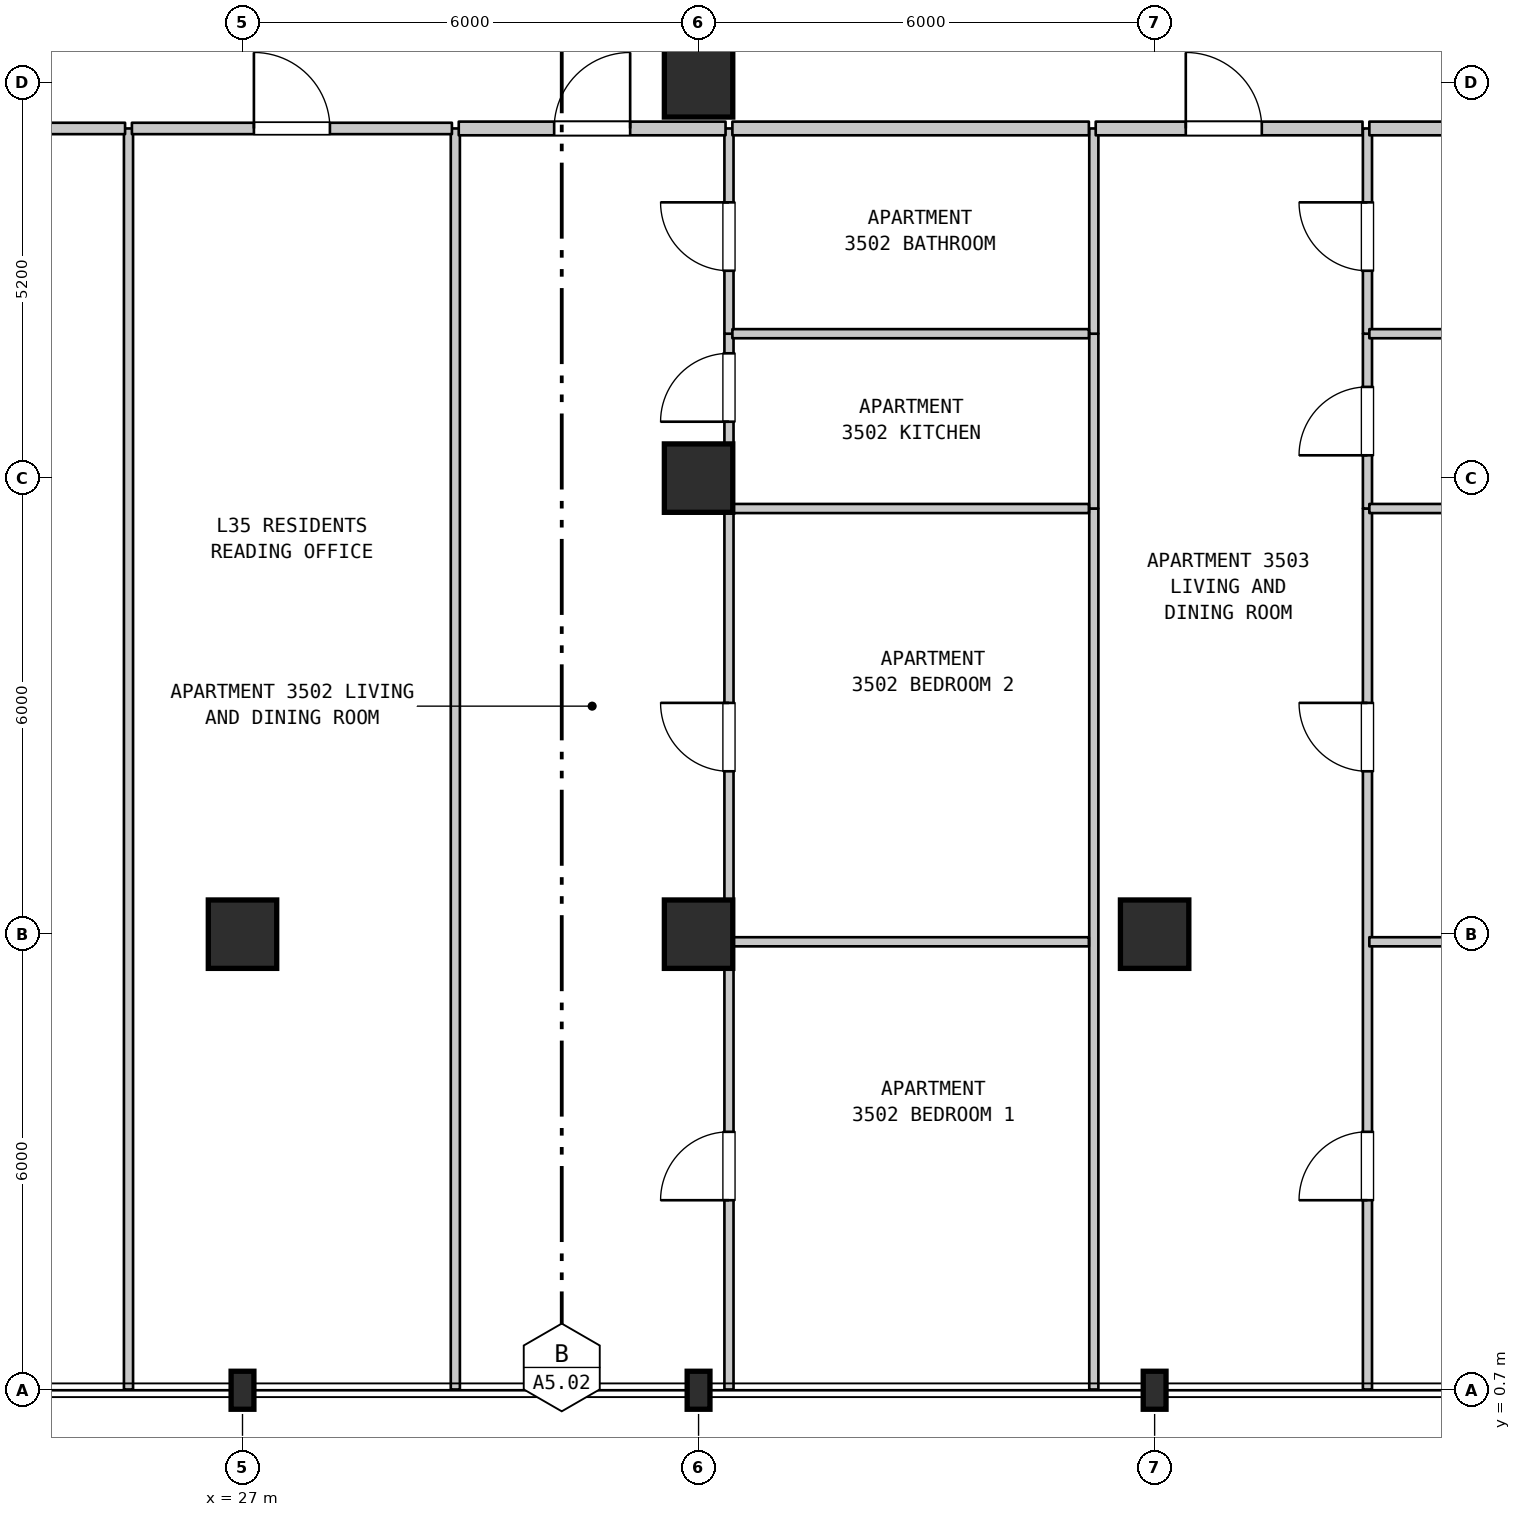
"""IFC4 building model, lengths in metres.
Left out: names, types, materials, properties, quantities, classifications, styles, units other than length and angle.
Written with IfcOpenShell. Run it as: python <this file> out.ifc"""

import sys

from ifc_helpers import new_model, si_unit, direction, frame, frame_2d, origin, origin_2d, place, context, subcontext, project, spatial, rectangle, i_section, extrude, element, fill, save


model = new_model("IFC4")
c1 = context("Model", 3, precision=1e-05, world=origin(), true_north=direction((0.0, 1.0)))
c2 = subcontext(c1, "Body", "Model", "MODEL_VIEW")
j1 = project(units=[si_unit("LENGTHUNIT", "METRE"), si_unit("PLANEANGLEUNIT", "RADIAN")], contexts=[c1])
p1 = place(None, origin())
s1 = spatial("IfcSite", under=j1, at=p1, CompositionType="ELEMENT")
p2 = place(p1, origin())
s2 = spatial("IfcBuilding", under=s1, at=p2, CompositionType="ELEMENT")
p3 = place(p2, frame((0.0, 0.0, 144.6)))
s3 = spatial("IfcBuildingStorey", under=s2, at=p3, CompositionType="ELEMENT", Elevation=144.6)
p4 = place(p3, frame((27.0, 0.7, 0.0), z_axis=(0.0, 0.0, 1.0), x_axis=(1.0, 0.0, 0.0)))
e1 = element("IfcColumn", 1, at=p4, inside=s3, PredefinedType="COLUMN", context=c2, shape_type="SweptSolid", body=[
    extrude(i_section(OverallWidth=0.3, OverallDepth=0.5, WebThickness=0.014, FlangeThickness=0.028, FilletRadius=0.027, at=origin_2d()), origin(), (0.0, 0.0, 1.0), 3.7),
])
p5 = place(p3, frame((27.0, 6.7, 0.0), z_axis=(0.0, 0.0, 1.0), x_axis=(1.0, 0.0, 0.0)))
e2 = element("IfcColumn", 2, at=p5, inside=s3, PredefinedType="COLUMN", context=c2, shape_type="SweptSolid", body=[
    extrude(rectangle(XDim=0.9, YDim=0.9, at=origin_2d()), origin(), (0.0, 0.0, 1.0), 3.7),
])
p6 = place(p3, frame((33.0, 0.7, 0.0), z_axis=(0.0, 0.0, 1.0), x_axis=(1.0, 0.0, 0.0)))
e3 = element("IfcColumn", 3, at=p6, inside=s3, PredefinedType="COLUMN", context=c2, shape_type="SweptSolid", body=[
    extrude(i_section(OverallWidth=0.3, OverallDepth=0.5, WebThickness=0.014, FlangeThickness=0.028, FilletRadius=0.027, at=origin_2d()), origin(), (0.0, 0.0, 1.0), 3.7),
])
for number, where, z_axis, x_axis in (
    (4, (33.0, 6.7, 0.0), (0.0, 0.0, 1.0), (1.0, 0.0, 0.0)),
    (5, (33.0, 12.7, 0.0), (0.0, 0.0, 1.0), (1.0, 0.0, 0.0)),
    (6, (33.0, 17.9, 0.0), (0.0, 0.0, 1.0), (1.0, 0.0, 0.0)),
):
    element("IfcColumn", number, at=place(p3, frame(where, z_axis=z_axis, x_axis=x_axis)), inside=s3, PredefinedType="COLUMN", context=c2, shape_type="SweptSolid", body=[
        extrude(rectangle(XDim=0.9, YDim=0.9, at=origin_2d()), origin(), (0.0, 0.0, 1.0), 3.7),
    ])
p7 = place(p3, frame((39.0, 0.7, 0.0), z_axis=(0.0, 0.0, 1.0), x_axis=(1.0, 0.0, 0.0)))
e7 = element("IfcColumn", 7, at=p7, inside=s3, PredefinedType="COLUMN", context=c2, shape_type="SweptSolid", body=[
    extrude(i_section(OverallWidth=0.3, OverallDepth=0.5, WebThickness=0.014, FlangeThickness=0.028, FilletRadius=0.027, at=origin_2d()), origin(), (0.0, 0.0, 1.0), 3.7),
])
p8 = place(p3, frame((39.0, 6.7, 0.0), z_axis=(0.0, 0.0, 1.0), x_axis=(1.0, 0.0, 0.0)))
e8 = element("IfcColumn", 8, at=p8, inside=s3, PredefinedType="COLUMN", context=c2, shape_type="SweptSolid", body=[
    extrude(rectangle(XDim=0.9, YDim=0.9, at=origin_2d()), origin(), (0.0, 0.0, 1.0), 3.7),
])
for number, where, z_axis, x_axis in (
    (9, (25.5, 0.71, 0.0), (0.0, 0.0, 1.0), (0.0, 1.0, 0.0)),
    (10, (29.8, 0.71, 0.0), (0.0, 0.0, 1.0), (0.0, 1.0, 0.0)),
):
    element("IfcWall", number, at=place(p3, frame(where, z_axis=z_axis, x_axis=x_axis)), inside=s3, PredefinedType="PARTITIONING", context=c2, shape_type="SweptSolid", body=[
        extrude(rectangle(XDim=16.59, YDim=0.12, at=frame_2d((8.295, 0.0))), origin(), (0.0, 0.0, 1.0), 3.385),
    ])
p9 = place(p3, frame((33.4, 0.71, 0.0), z_axis=(0.0, 0.0, 1.0), x_axis=(0.0, 1.0, 0.0)))
e11 = element("IfcWall", 11, at=p9, inside=s3, PredefinedType="PARTITIONING", context=c2, shape_type="SweptSolid", body=[
    extrude(rectangle(XDim=11.59, YDim=0.12, at=frame_2d((5.795, 0.0))), origin(), (0.0, 0.0, 1.0), 3.385),
])
p10 = place(p9, frame((2.49, 0.0, 0.0)))
e12 = element("IfcOpeningElement", 12, at=p10, cuts=e11, PredefinedType="OPENING", context=c2, shape_type="SweptSolid", body=[
    extrude(rectangle(XDim=0.9, YDim=2.15, at=frame_2d((0.45, 1.075))), frame((0.0, 0.07, 0.0), z_axis=(0.0, -1.0, 0.0), x_axis=(1.0, 0.0, 0.0)), (0.0, 0.0, 1.0), 0.14),
])
p11 = place(p9, frame((8.133, 0.0, 0.0)))
e13 = element("IfcOpeningElement", 13, at=p11, cuts=e11, PredefinedType="OPENING", context=c2, shape_type="SweptSolid", body=[
    extrude(rectangle(XDim=0.9, YDim=2.15, at=frame_2d((0.45, 1.075))), frame((0.0, 0.07, 0.0), z_axis=(0.0, -1.0, 0.0), x_axis=(1.0, 0.0, 0.0)), (0.0, 0.0, 1.0), 0.14),
])
p12 = place(p3, frame((33.4, 12.3, 0.0), z_axis=(0.0, 0.0, 1.0), x_axis=(0.0, 1.0, 0.0)))
e14 = element("IfcWall", 14, at=p12, inside=s3, PredefinedType="PARTITIONING", context=c2, shape_type="SweptSolid", body=[
    extrude(rectangle(XDim=2.3, YDim=0.12, at=frame_2d((1.15, 0.0))), origin(), (0.0, 0.0, 1.0), 3.385),
])
p13 = place(p12, frame((1.142, 0.0, 0.0)))
e15 = element("IfcOpeningElement", 15, at=p13, cuts=e14, PredefinedType="OPENING", context=c2, shape_type="SweptSolid", body=[
    extrude(rectangle(XDim=0.9, YDim=2.15, at=frame_2d((0.45, 1.075))), frame((0.0, 0.07, 0.0), z_axis=(0.0, -1.0, 0.0), x_axis=(1.0, 0.0, 0.0)), (0.0, 0.0, 1.0), 0.14),
])
p14 = place(p3, frame((33.4, 14.6, 0.0), z_axis=(0.0, 0.0, 1.0), x_axis=(0.0, 1.0, 0.0)))
e16 = element("IfcWall", 16, at=p14, inside=s3, PredefinedType="PARTITIONING", context=c2, shape_type="SweptSolid", body=[
    extrude(rectangle(XDim=2.7, YDim=0.12, at=frame_2d((1.35, 0.0))), origin(), (0.0, 0.0, 1.0), 3.385),
])
p15 = place(p14, frame((0.828, 0.0, 0.0)))
e17 = element("IfcOpeningElement", 17, at=p15, cuts=e16, PredefinedType="OPENING", context=c2, shape_type="SweptSolid", body=[
    extrude(rectangle(XDim=0.9, YDim=2.1, at=frame_2d((0.45, 1.05))), frame((0.0, 0.07, 0.0), z_axis=(0.0, -1.0, 0.0), x_axis=(1.0, 0.0, 0.0)), (0.0, 0.0, 1.0), 0.14),
])
p16 = place(p3, frame((38.2, 0.71, 0.0), z_axis=(0.0, 0.0, 1.0), x_axis=(0.0, 1.0, 0.0)))
e18 = element("IfcWall", 18, at=p16, inside=s3, PredefinedType="PARTITIONING", context=c2, shape_type="SweptSolid", body=[
    extrude(rectangle(XDim=11.59, YDim=0.12, at=frame_2d((5.795, 0.0))), origin(), (0.0, 0.0, 1.0), 3.385),
])
p17 = place(p3, frame((38.2, 12.3, 0.0), z_axis=(0.0, 0.0, 1.0), x_axis=(0.0, 1.0, 0.0)))
e19 = element("IfcWall", 19, at=p17, inside=s3, PredefinedType="PARTITIONING", context=c2, shape_type="SweptSolid", body=[
    extrude(rectangle(XDim=2.3, YDim=0.12, at=frame_2d((1.15, 0.0))), origin(), (0.0, 0.0, 1.0), 3.385),
])
p18 = place(p3, frame((38.2, 14.6, 0.0), z_axis=(0.0, 0.0, 1.0), x_axis=(0.0, 1.0, 0.0)))
e20 = element("IfcWall", 20, at=p18, inside=s3, PredefinedType="PARTITIONING", context=c2, shape_type="SweptSolid", body=[
    extrude(rectangle(XDim=2.7, YDim=0.12, at=frame_2d((1.35, 0.0))), origin(), (0.0, 0.0, 1.0), 3.385),
])
p19 = place(p3, frame((41.8, 0.71, 0.0), z_axis=(0.0, 0.0, 1.0), x_axis=(0.0, 1.0, 0.0)))
e21 = element("IfcWall", 21, at=p19, inside=s3, PredefinedType="PARTITIONING", context=c2, shape_type="SweptSolid", body=[
    extrude(rectangle(XDim=11.59, YDim=0.12, at=frame_2d((5.795, 0.0))), origin(), (0.0, 0.0, 1.0), 3.385),
])
p20 = place(p19, frame((2.49, 0.0, 0.0)))
e22 = element("IfcOpeningElement", 22, at=p20, cuts=e21, PredefinedType="OPENING", context=c2, shape_type="SweptSolid", body=[
    extrude(rectangle(XDim=0.9, YDim=2.15, at=frame_2d((0.45, 1.075))), frame((0.0, 0.07, 0.0), z_axis=(0.0, -1.0, 0.0), x_axis=(1.0, 0.0, 0.0)), (0.0, 0.0, 1.0), 0.14),
])
p21 = place(p19, frame((8.133, 0.0, 0.0)))
e23 = element("IfcOpeningElement", 23, at=p21, cuts=e21, PredefinedType="OPENING", context=c2, shape_type="SweptSolid", body=[
    extrude(rectangle(XDim=0.9, YDim=2.15, at=frame_2d((0.45, 1.075))), frame((0.0, 0.07, 0.0), z_axis=(0.0, -1.0, 0.0), x_axis=(1.0, 0.0, 0.0)), (0.0, 0.0, 1.0), 0.14),
])
p22 = place(p3, frame((41.8, 12.3, 0.0), z_axis=(0.0, 0.0, 1.0), x_axis=(0.0, 1.0, 0.0)))
e24 = element("IfcWall", 24, at=p22, inside=s3, PredefinedType="PARTITIONING", context=c2, shape_type="SweptSolid", body=[
    extrude(rectangle(XDim=2.3, YDim=0.12, at=frame_2d((1.15, 0.0))), origin(), (0.0, 0.0, 1.0), 3.385),
])
p23 = place(p22, frame((0.7, 0.0, 0.0)))
e25 = element("IfcOpeningElement", 25, at=p23, cuts=e24, PredefinedType="OPENING", context=c2, shape_type="SweptSolid", body=[
    extrude(rectangle(XDim=0.9, YDim=2.15, at=frame_2d((0.45, 1.075))), frame((0.0, 0.07, 0.0), z_axis=(0.0, -1.0, 0.0), x_axis=(1.0, 0.0, 0.0)), (0.0, 0.0, 1.0), 0.14),
])
p24 = place(p3, frame((41.8, 14.6, 0.0), z_axis=(0.0, 0.0, 1.0), x_axis=(0.0, 1.0, 0.0)))
e26 = element("IfcWall", 26, at=p24, inside=s3, PredefinedType="PARTITIONING", context=c2, shape_type="SweptSolid", body=[
    extrude(rectangle(XDim=2.7, YDim=0.12, at=frame_2d((1.35, 0.0))), origin(), (0.0, 0.0, 1.0), 3.385),
])
p25 = place(p24, frame((0.828, 0.0, 0.0)))
e27 = element("IfcOpeningElement", 27, at=p25, cuts=e26, PredefinedType="OPENING", context=c2, shape_type="SweptSolid", body=[
    extrude(rectangle(XDim=0.9, YDim=2.1, at=frame_2d((0.45, 1.05))), frame((0.0, 0.07, 0.0), z_axis=(0.0, -1.0, 0.0), x_axis=(1.0, 0.0, 0.0)), (0.0, 0.0, 1.0), 0.14),
])
p26 = place(p3, frame((33.445, 6.6, 0.0), z_axis=(0.0, 0.0, 1.0), x_axis=(1.0, 0.0, 0.0)))
e28 = element("IfcWall", 28, at=p26, inside=s3, PredefinedType="PARTITIONING", context=c2, shape_type="SweptSolid", body=[
    extrude(rectangle(XDim=4.69, YDim=0.12, at=frame_2d((2.345, 0.0))), origin(), (0.0, 0.0, 1.0), 2.935),
])
p27 = place(p3, frame((41.825, 6.6, 0.0), z_axis=(0.0, 0.0, 1.0), x_axis=(1.0, 0.0, 0.0)))
e29 = element("IfcWall", 29, at=p27, inside=s3, PredefinedType="PARTITIONING", context=c2, shape_type="SweptSolid", body=[
    extrude(rectangle(XDim=4.97, YDim=0.12, at=frame_2d((2.485, 0.0))), origin(), (0.0, 0.0, 1.0), 2.785),
])
p28 = place(p3, frame((33.445, 12.3, 0.0), z_axis=(0.0, 0.0, 1.0), x_axis=(1.0, 0.0, 0.0)))
e30 = element("IfcWall", 30, at=p28, inside=s3, PredefinedType="PARTITIONING", context=c2, shape_type="SweptSolid", body=[
    extrude(rectangle(XDim=4.69, YDim=0.12, at=frame_2d((2.345, 0.0))), origin(), (0.0, 0.0, 1.0), 3.385),
])
p29 = place(p3, frame((41.825, 12.3, 0.0), z_axis=(0.0, 0.0, 1.0), x_axis=(1.0, 0.0, 0.0)))
e31 = element("IfcWall", 31, at=p29, inside=s3, PredefinedType="PARTITIONING", context=c2, shape_type="SweptSolid", body=[
    extrude(rectangle(XDim=4.97, YDim=0.12, at=frame_2d((2.485, 0.0))), origin(), (0.0, 0.0, 1.0), 3.385),
])
p30 = place(p3, frame((33.445, 14.6, 0.0), z_axis=(0.0, 0.0, 1.0), x_axis=(1.0, 0.0, 0.0)))
e32 = element("IfcWall", 32, at=p30, inside=s3, PredefinedType="PARTITIONING", context=c2, shape_type="SweptSolid", body=[
    extrude(rectangle(XDim=4.69, YDim=0.12, at=frame_2d((2.345, 0.0))), origin(), (0.0, 0.0, 1.0), 3.385),
])
p31 = place(p3, frame((41.825, 14.6, 0.0), z_axis=(0.0, 0.0, 1.0), x_axis=(1.0, 0.0, 0.0)))
e33 = element("IfcWall", 33, at=p31, inside=s3, PredefinedType="PARTITIONING", context=c2, shape_type="SweptSolid", body=[
    extrude(rectangle(XDim=4.97, YDim=0.12, at=frame_2d((2.485, 0.0))), origin(), (0.0, 0.0, 1.0), 3.385),
])
p32 = place(p3, frame((20.545, 17.3, 0.0), z_axis=(0.0, 0.0, 1.0), x_axis=(1.0, 0.0, 0.0)))
e34 = element("IfcWall", 34, at=p32, inside=s3, PredefinedType="STANDARD", context=c2, shape_type="SweptSolid", body=[
    extrude(rectangle(XDim=4.91, YDim=0.15, at=frame_2d((2.455, 0.0))), origin(), (0.0, 0.0, 1.0), 3.385),
])
p33 = place(p32, frame((1.884, 0.0, 0.0)))
e35 = element("IfcOpeningElement", 35, at=p33, cuts=e34, PredefinedType="OPENING", context=c2, shape_type="SweptSolid", body=[
    extrude(rectangle(XDim=1.0, YDim=2.15, at=frame_2d((0.5, 1.075))), frame((0.0, 0.085, 0.0), z_axis=(0.0, -1.0, 0.0), x_axis=(1.0, 0.0, 0.0)), (0.0, 0.0, 1.0), 0.17),
])
p34 = place(p3, frame((25.545, 17.3, 0.0), z_axis=(0.0, 0.0, 1.0), x_axis=(1.0, 0.0, 0.0)))
e36 = element("IfcWall", 36, at=p34, inside=s3, PredefinedType="STANDARD", context=c2, shape_type="SweptSolid", body=[
    extrude(rectangle(XDim=4.21, YDim=0.15, at=frame_2d((2.105, 0.0))), origin(), (0.0, 0.0, 1.0), 3.385),
])
p35 = place(p34, frame((1.605, 0.0, 0.0)))
e37 = element("IfcOpeningElement", 37, at=p35, cuts=e36, PredefinedType="OPENING", context=c2, shape_type="SweptSolid", body=[
    extrude(rectangle(XDim=1.0, YDim=2.15, at=frame_2d((0.5, 1.075))), frame((0.0, 0.085, 0.0), z_axis=(0.0, -1.0, 0.0), x_axis=(1.0, 0.0, 0.0)), (0.0, 0.0, 1.0), 0.17),
])
p36 = place(p3, frame((29.845, 17.3, 0.0), z_axis=(0.0, 0.0, 1.0), x_axis=(1.0, 0.0, 0.0)))
e38 = element("IfcWall", 38, at=p36, inside=s3, PredefinedType="STANDARD", context=c2, shape_type="SweptSolid", body=[
    extrude(rectangle(XDim=3.51, YDim=0.18, at=frame_2d((1.755, 0.0))), origin(), (0.0, 0.0, 1.0), 3.385),
])
p37 = place(p36, frame((1.255, 0.0, 0.0)))
e39 = element("IfcOpeningElement", 39, at=p37, cuts=e38, PredefinedType="OPENING", context=c2, shape_type="SweptSolid", body=[
    extrude(rectangle(XDim=1.0, YDim=2.15, at=frame_2d((0.5, 1.075))), frame((0.0, 0.1, 0.0), z_axis=(0.0, -1.0, 0.0), x_axis=(1.0, 0.0, 0.0)), (0.0, 0.0, 1.0), 0.2),
])
p38 = place(p3, frame((33.445, 17.3, 0.0), z_axis=(0.0, 0.0, 1.0), x_axis=(1.0, 0.0, 0.0)))
e40 = element("IfcWall", 40, at=p38, inside=s3, PredefinedType="STANDARD", context=c2, shape_type="SweptSolid", body=[
    extrude(rectangle(XDim=4.69, YDim=0.18, at=frame_2d((2.345, 0.0))), origin(), (0.0, 0.0, 1.0), 3.385),
])
p39 = place(p3, frame((38.225, 17.3, 0.0), z_axis=(0.0, 0.0, 1.0), x_axis=(1.0, 0.0, 0.0)))
e41 = element("IfcWall", 41, at=p39, inside=s3, PredefinedType="STANDARD", context=c2, shape_type="SweptSolid", body=[
    extrude(rectangle(XDim=3.51, YDim=0.18, at=frame_2d((1.755, 0.0))), origin(), (0.0, 0.0, 1.0), 3.385),
])
p40 = place(p39, frame((1.185, 0.0, 0.0)))
e42 = element("IfcOpeningElement", 42, at=p40, cuts=e41, PredefinedType="OPENING", context=c2, shape_type="SweptSolid", body=[
    extrude(rectangle(XDim=1.0, YDim=2.15, at=frame_2d((0.5, 1.075))), frame((0.0, 0.1, 0.0), z_axis=(0.0, -1.0, 0.0), x_axis=(1.0, 0.0, 0.0)), (0.0, 0.0, 1.0), 0.2),
])
p41 = place(p3, frame((41.825, 17.3, 0.0), z_axis=(0.0, 0.0, 1.0), x_axis=(1.0, 0.0, 0.0)))
e43 = element("IfcWall", 43, at=p41, inside=s3, PredefinedType="STANDARD", context=c2, shape_type="SweptSolid", body=[
    extrude(rectangle(XDim=4.97, YDim=0.18, at=frame_2d((2.485, 0.0))), origin(), (0.0, 0.0, 1.0), 3.385),
])
p42 = place(p10, origin())
e44 = element("IfcDoor", 44, at=p42, inside=s3, OperationType="SINGLE_SWING_LEFT", PredefinedType="DOOR", context=c2, shape_type="SweptSolid", body=[
    extrude(rectangle(XDim=0.9, YDim=2.15, at=frame_2d((0.45, 1.075))), frame((0.0, 0.025, 0.0), z_axis=(0.0, -1.0, 0.0), x_axis=(1.0, 0.0, 0.0)), (0.0, 0.0, 1.0), 0.05),
])
fill(e12, e44)
p43 = place(p11, origin())
e45 = element("IfcDoor", 45, at=p43, inside=s3, OperationType="SINGLE_SWING_RIGHT", PredefinedType="DOOR", context=c2, shape_type="SweptSolid", body=[
    extrude(rectangle(XDim=0.9, YDim=2.15, at=frame_2d((0.45, 1.075))), frame((0.0, 0.025, 0.0), z_axis=(0.0, -1.0, 0.0), x_axis=(1.0, 0.0, 0.0)), (0.0, 0.0, 1.0), 0.05),
])
fill(e13, e45)
p44 = place(p13, origin())
e46 = element("IfcDoor", 46, at=p44, inside=s3, OperationType="SINGLE_SWING_LEFT", PredefinedType="DOOR", context=c2, shape_type="SweptSolid", body=[
    extrude(rectangle(XDim=0.9, YDim=2.15, at=frame_2d((0.45, 1.075))), frame((0.0, 0.025, 0.0), z_axis=(0.0, -1.0, 0.0), x_axis=(1.0, 0.0, 0.0)), (0.0, 0.0, 1.0), 0.05),
])
fill(e15, e46)
p45 = place(p15, origin())
e47 = element("IfcDoor", 47, at=p45, inside=s3, OperationType="SINGLE_SWING_RIGHT", PredefinedType="DOOR", context=c2, shape_type="SweptSolid", body=[
    extrude(rectangle(XDim=0.9, YDim=2.1, at=frame_2d((0.45, 1.05))), frame((0.0, 0.025, 0.0), z_axis=(0.0, -1.0, 0.0), x_axis=(1.0, 0.0, 0.0)), (0.0, 0.0, 1.0), 0.05),
])
fill(e17, e47)
p46 = place(p20, origin())
e48 = element("IfcDoor", 48, at=p46, inside=s3, OperationType="SINGLE_SWING_LEFT", PredefinedType="DOOR", context=c2, shape_type="SweptSolid", body=[
    extrude(rectangle(XDim=0.9, YDim=2.15, at=frame_2d((0.45, 1.075))), frame((0.0, 0.025, 0.0), z_axis=(0.0, -1.0, 0.0), x_axis=(1.0, 0.0, 0.0)), (0.0, 0.0, 1.0), 0.05),
])
fill(e22, e48)
p47 = place(p21, origin())
e49 = element("IfcDoor", 49, at=p47, inside=s3, OperationType="SINGLE_SWING_RIGHT", PredefinedType="DOOR", context=c2, shape_type="SweptSolid", body=[
    extrude(rectangle(XDim=0.9, YDim=2.15, at=frame_2d((0.45, 1.075))), frame((0.0, 0.025, 0.0), z_axis=(0.0, -1.0, 0.0), x_axis=(1.0, 0.0, 0.0)), (0.0, 0.0, 1.0), 0.05),
])
fill(e23, e49)
p48 = place(p23, origin())
e50 = element("IfcDoor", 50, at=p48, inside=s3, OperationType="SINGLE_SWING_LEFT", PredefinedType="DOOR", context=c2, shape_type="SweptSolid", body=[
    extrude(rectangle(XDim=0.9, YDim=2.15, at=frame_2d((0.45, 1.075))), frame((0.0, 0.025, 0.0), z_axis=(0.0, -1.0, 0.0), x_axis=(1.0, 0.0, 0.0)), (0.0, 0.0, 1.0), 0.05),
])
fill(e25, e50)
p49 = place(p25, origin())
e51 = element("IfcDoor", 51, at=p49, inside=s3, OperationType="SINGLE_SWING_RIGHT", PredefinedType="DOOR", context=c2, shape_type="SweptSolid", body=[
    extrude(rectangle(XDim=0.9, YDim=2.1, at=frame_2d((0.45, 1.05))), frame((0.0, 0.025, 0.0), z_axis=(0.0, -1.0, 0.0), x_axis=(1.0, 0.0, 0.0)), (0.0, 0.0, 1.0), 0.05),
])
fill(e27, e51)
p50 = place(p35, origin())
e52 = element("IfcDoor", 52, at=p50, inside=s3, OperationType="SINGLE_SWING_LEFT", PredefinedType="DOOR", context=c2, shape_type="SweptSolid", body=[
    extrude(rectangle(XDim=1.0, YDim=2.15, at=frame_2d((0.5, 1.075))), frame((0.0, 0.025, 0.0), z_axis=(0.0, -1.0, 0.0), x_axis=(1.0, 0.0, 0.0)), (0.0, 0.0, 1.0), 0.05),
])
fill(e37, e52)
p51 = place(p37, origin())
e53 = element("IfcDoor", 53, at=p51, inside=s3, OperationType="SINGLE_SWING_RIGHT", PredefinedType="DOOR", context=c2, shape_type="SweptSolid", body=[
    extrude(rectangle(XDim=1.0, YDim=2.15, at=frame_2d((0.5, 1.075))), frame((0.0, 0.025, 0.0), z_axis=(0.0, -1.0, 0.0), x_axis=(1.0, 0.0, 0.0)), (0.0, 0.0, 1.0), 0.05),
])
fill(e39, e53)
p52 = place(p40, origin())
e54 = element("IfcDoor", 54, at=p52, inside=s3, OperationType="SINGLE_SWING_LEFT", PredefinedType="DOOR", context=c2, shape_type="SweptSolid", body=[
    extrude(rectangle(XDim=1.0, YDim=2.15, at=frame_2d((0.5, 1.075))), frame((0.0, 0.025, 0.0), z_axis=(0.0, -1.0, 0.0), x_axis=(1.0, 0.0, 0.0)), (0.0, 0.0, 1.0), 0.05),
])
fill(e42, e54)
save(model, sys.argv[1])
